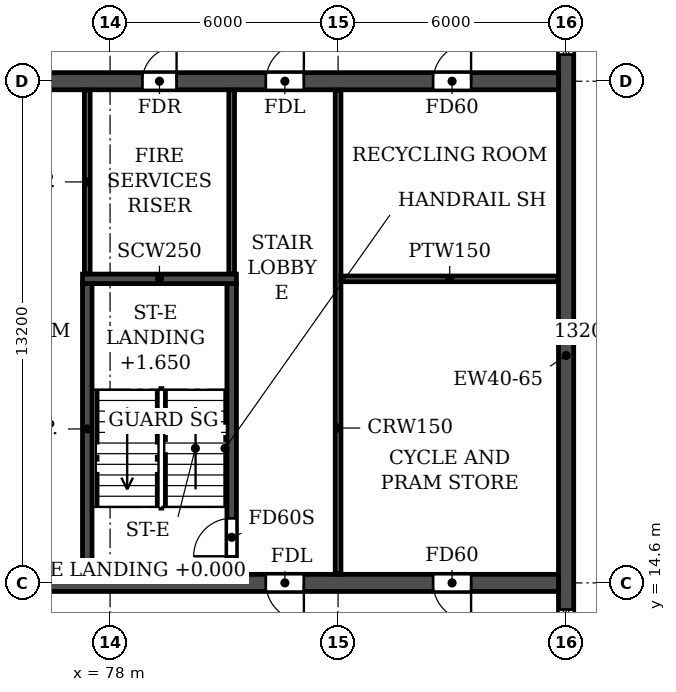
"""IFC4 building model, lengths in metres.
Left out: names, types, materials, properties, quantities, classifications, styles, units other than length and angle.
Written with IfcOpenShell. Run it as: python <this file> out.ifc"""

import sys

from ifc_helpers import new_model, si_unit, direction, frame, frame_2d, origin, place, context, subcontext, project, spatial, rectangle, extrude, element, fill, save


model = new_model("IFC4")
c1 = context("Model", 3, precision=1e-05, world=origin(), true_north=direction((0.0, 1.0)))
c2 = subcontext(c1, "Body", "Model", "MODEL_VIEW")
j1 = project(units=[si_unit("LENGTHUNIT", "METRE"), si_unit("PLANEANGLEUNIT", "RADIAN")], contexts=[c1])
p1 = place(None, origin())
s1 = spatial("IfcSite", under=j1, at=p1, CompositionType="ELEMENT")
p2 = place(p1, origin())
s2 = spatial("IfcBuilding", under=s1, at=p2, CompositionType="ELEMENT")
p3 = place(p2, frame((0.0, 0.0, 132.3)))
s3 = spatial("IfcBuildingStorey", under=s2, at=p3, CompositionType="ELEMENT", Elevation=132.3)
p4 = place(p3, frame((90.0, 4.683, 0.0), z_axis=(0.0, 0.0, 1.0), x_axis=(0.0, 1.0, 0.0)))
e1 = element("IfcWall", 1, at=p4, inside=s3, PredefinedType="SHEAR", context=c2, shape_type="SweptSolid", body=[
    extrude(rectangle(XDim=33.034, YDim=0.4, at=frame_2d((16.517, 0.0))), origin(), (0.0, 0.0, 1.0), 3.07),
])
p5 = place(p4, frame((23.817, 0.0, 0.9)))
e2 = element("IfcOpeningElement", 2, at=p5, cuts=e1, PredefinedType="OPENING", context=c2, shape_type="SweptSolid", body=[
    extrude(rectangle(XDim=1.2, YDim=1.5, at=frame_2d((0.6, 0.75))), frame((0.0, 0.21, 0.0), z_axis=(0.0, -1.0, 0.0), x_axis=(1.0, 0.0, 0.0)), (0.0, 0.0, 1.0), 0.42),
])
p6 = place(p4, frame((8.017, 0.0, 0.9)))
e3 = element("IfcOpeningElement", 3, at=p6, cuts=e1, PredefinedType="OPENING", context=c2, shape_type="SweptSolid", body=[
    extrude(rectangle(XDim=1.2, YDim=1.5, at=frame_2d((0.6, 0.75))), frame((0.0, 0.21, 0.0), z_axis=(0.0, -1.0, 0.0), x_axis=(1.0, 0.0, 0.0)), (0.0, 0.0, 1.0), 0.42),
])
p7 = place(p4, frame((28.293, 0.0, 0.6)))
e4 = element("IfcOpeningElement", 4, at=p7, cuts=e1, PredefinedType="OPENING", context=c2, shape_type="SweptSolid", body=[
    extrude(rectangle(XDim=2.2, YDim=1.8, at=frame_2d((1.1, 0.9))), frame((0.0, 0.21, 0.0), z_axis=(0.0, -1.0, 0.0), x_axis=(1.0, 0.0, 0.0)), (0.0, 0.0, 1.0), 0.42),
])
p8 = place(p4, frame((2.541, 0.0, 0.6)))
e5 = element("IfcOpeningElement", 5, at=p8, cuts=e1, PredefinedType="OPENING", context=c2, shape_type="SweptSolid", body=[
    extrude(rectangle(XDim=2.2, YDim=1.8, at=frame_2d((1.1, 0.9))), frame((0.0, 0.21, 0.0), z_axis=(0.0, -1.0, 0.0), x_axis=(1.0, 0.0, 0.0)), (0.0, 0.0, 1.0), 0.42),
])
p9 = place(p3, frame((12.2, 14.6, 0.0), z_axis=(0.0, 0.0, 1.0), x_axis=(1.0, 0.0, 0.0)))
e6 = element("IfcWall", 6, at=p9, inside=s3, PredefinedType="SOLIDWALL", context=c2, shape_type="SweptSolid", body=[
    extrude(rectangle(XDim=77.6, YDim=0.45, at=frame_2d((38.8, 0.0))), origin(), (0.0, 0.0, 1.0), 3.07),
])
p10 = place(p9, frame((2.3, 0.0, 0.0)))
e7 = element("IfcOpeningElement", 7, at=p10, cuts=e6, PredefinedType="OPENING", context=c2, shape_type="SweptSolid", body=[
    extrude(rectangle(XDim=1.0, YDim=2.1, at=frame_2d((0.5, 1.05))), frame((0.0, 0.235, 0.0), z_axis=(0.0, -1.0, 0.0), x_axis=(1.0, 0.0, 0.0)), (0.0, 0.0, 1.0), 0.47),
])
p11 = place(p9, frame((6.7, 0.0, 0.0)))
e8 = element("IfcOpeningElement", 8, at=p11, cuts=e6, PredefinedType="OPENING", context=c2, shape_type="SweptSolid", body=[
    extrude(rectangle(XDim=1.0, YDim=2.1, at=frame_2d((0.5, 1.05))), frame((0.0, 0.235, 0.0), z_axis=(0.0, -1.0, 0.0), x_axis=(1.0, 0.0, 0.0)), (0.0, 0.0, 1.0), 0.47),
])
p12 = place(p9, frame((14.6, 0.0, 0.0)))
e9 = element("IfcOpeningElement", 9, at=p12, cuts=e6, PredefinedType="OPENING", context=c2, shape_type="SweptSolid", body=[
    extrude(rectangle(XDim=1.0, YDim=2.1, at=frame_2d((0.5, 1.05))), frame((0.0, 0.235, 0.0), z_axis=(0.0, -1.0, 0.0), x_axis=(1.0, 0.0, 0.0)), (0.0, 0.0, 1.0), 0.47),
])
p13 = place(p9, frame((19.2, 0.0, 0.0)))
e10 = element("IfcOpeningElement", 10, at=p13, cuts=e6, PredefinedType="OPENING", context=c2, shape_type="SweptSolid", body=[
    extrude(rectangle(XDim=1.0, YDim=2.1, at=frame_2d((0.5, 1.05))), frame((0.0, 0.235, 0.0), z_axis=(0.0, -1.0, 0.0), x_axis=(1.0, 0.0, 0.0)), (0.0, 0.0, 1.0), 0.47),
])
p14 = place(p9, frame((31.55, 0.0, 0.0)))
e11 = element("IfcOpeningElement", 11, at=p14, cuts=e6, PredefinedType="OPENING", context=c2, shape_type="SweptSolid", body=[
    extrude(rectangle(XDim=1.5, YDim=2.1, at=frame_2d((0.75, 1.05))), frame((0.0, 0.235, 0.0), z_axis=(0.0, -1.0, 0.0), x_axis=(1.0, 0.0, 0.0)), (0.0, 0.0, 1.0), 0.47),
])
p15 = place(p9, frame((35.7, 0.0, 0.0)))
e12 = element("IfcOpeningElement", 12, at=p15, cuts=e6, PredefinedType="OPENING", context=c2, shape_type="SweptSolid", body=[
    extrude(rectangle(XDim=1.0, YDim=2.1, at=frame_2d((0.5, 1.05))), frame((0.0, 0.235, 0.0), z_axis=(0.0, -1.0, 0.0), x_axis=(1.0, 0.0, 0.0)), (0.0, 0.0, 1.0), 0.47),
])
p16 = place(p9, frame((38.3, 0.0, 0.0)))
e13 = element("IfcOpeningElement", 13, at=p16, cuts=e6, PredefinedType="OPENING", context=c2, shape_type="SweptSolid", body=[
    extrude(rectangle(XDim=1.0, YDim=2.1, at=frame_2d((0.5, 1.05))), frame((0.0, 0.235, 0.0), z_axis=(0.0, -1.0, 0.0), x_axis=(1.0, 0.0, 0.0)), (0.0, 0.0, 1.0), 0.47),
])
p17 = place(p9, frame((40.9, 0.0, 0.0)))
e14 = element("IfcOpeningElement", 14, at=p17, cuts=e6, PredefinedType="OPENING", context=c2, shape_type="SweptSolid", body=[
    extrude(rectangle(XDim=1.0, YDim=2.1, at=frame_2d((0.5, 1.05))), frame((0.0, 0.235, 0.0), z_axis=(0.0, -1.0, 0.0), x_axis=(1.0, 0.0, 0.0)), (0.0, 0.0, 1.0), 0.47),
])
p18 = place(p9, frame((44.55, 0.0, 0.0)))
e15 = element("IfcOpeningElement", 15, at=p18, cuts=e6, PredefinedType="OPENING", context=c2, shape_type="SweptSolid", body=[
    extrude(rectangle(XDim=1.5, YDim=2.1, at=frame_2d((0.75, 1.05))), frame((0.0, 0.235, 0.0), z_axis=(0.0, -1.0, 0.0), x_axis=(1.0, 0.0, 0.0)), (0.0, 0.0, 1.0), 0.47),
])
p19 = place(p9, frame((57.4, 0.0, 0.0)))
e16 = element("IfcOpeningElement", 16, at=p19, cuts=e6, PredefinedType="OPENING", context=c2, shape_type="SweptSolid", body=[
    extrude(rectangle(XDim=1.0, YDim=2.1, at=frame_2d((0.5, 1.05))), frame((0.0, 0.235, 0.0), z_axis=(0.0, -1.0, 0.0), x_axis=(1.0, 0.0, 0.0)), (0.0, 0.0, 1.0), 0.47),
])
p20 = place(p9, frame((62.0, 0.0, 0.0)))
e17 = element("IfcOpeningElement", 17, at=p20, cuts=e6, PredefinedType="OPENING", context=c2, shape_type="SweptSolid", body=[
    extrude(rectangle(XDim=1.0, YDim=2.1, at=frame_2d((0.5, 1.05))), frame((0.0, 0.235, 0.0), z_axis=(0.0, -1.0, 0.0), x_axis=(1.0, 0.0, 0.0)), (0.0, 0.0, 1.0), 0.47),
])
p21 = place(p9, frame((69.9, 0.0, 0.0)))
e18 = element("IfcOpeningElement", 18, at=p21, cuts=e6, PredefinedType="OPENING", context=c2, shape_type="SweptSolid", body=[
    extrude(rectangle(XDim=1.0, YDim=2.1, at=frame_2d((0.5, 1.05))), frame((0.0, 0.235, 0.0), z_axis=(0.0, -1.0, 0.0), x_axis=(1.0, 0.0, 0.0)), (0.0, 0.0, 1.0), 0.47),
])
p22 = place(p9, frame((74.3, 0.0, 0.0)))
e19 = element("IfcOpeningElement", 19, at=p22, cuts=e6, PredefinedType="OPENING", context=c2, shape_type="SweptSolid", body=[
    extrude(rectangle(XDim=1.0, YDim=2.1, at=frame_2d((0.5, 1.05))), frame((0.0, 0.235, 0.0), z_axis=(0.0, -1.0, 0.0), x_axis=(1.0, 0.0, 0.0)), (0.0, 0.0, 1.0), 0.47),
])
p23 = place(p3, frame((12.2, 27.8, 0.0), z_axis=(0.0, 0.0, 1.0), x_axis=(1.0, 0.0, 0.0)))
e20 = element("IfcWall", 20, at=p23, inside=s3, PredefinedType="SOLIDWALL", context=c2, shape_type="SweptSolid", body=[
    extrude(rectangle(XDim=77.6, YDim=0.45, at=frame_2d((38.8, 0.0))), origin(), (0.0, 0.0, 1.0), 3.07),
])
p24 = place(p23, frame((2.05, 0.0, 0.0)))
e21 = element("IfcOpeningElement", 21, at=p24, cuts=e20, PredefinedType="OPENING", context=c2, shape_type="SweptSolid", body=[
    extrude(rectangle(XDim=1.5, YDim=2.1, at=frame_2d((0.75, 1.05))), frame((0.0, 0.235, 0.0), z_axis=(0.0, -1.0, 0.0), x_axis=(1.0, 0.0, 0.0)), (0.0, 0.0, 1.0), 0.47),
])
p25 = place(p23, frame((6.7, 0.0, 0.0)))
e22 = element("IfcOpeningElement", 22, at=p25, cuts=e20, PredefinedType="OPENING", context=c2, shape_type="SweptSolid", body=[
    extrude(rectangle(XDim=1.0, YDim=2.1, at=frame_2d((0.5, 1.05))), frame((0.0, 0.235, 0.0), z_axis=(0.0, -1.0, 0.0), x_axis=(1.0, 0.0, 0.0)), (0.0, 0.0, 1.0), 0.47),
])
p26 = place(p23, frame((10.05, 0.0, 0.0)))
e23 = element("IfcOpeningElement", 23, at=p26, cuts=e20, PredefinedType="OPENING", context=c2, shape_type="SweptSolid", body=[
    extrude(rectangle(XDim=0.9, YDim=2.1, at=frame_2d((0.45, 1.05))), frame((0.0, 0.235, 0.0), z_axis=(0.0, -1.0, 0.0), x_axis=(1.0, 0.0, 0.0)), (0.0, 0.0, 1.0), 0.47),
])
p27 = place(p23, frame((19.25, 0.0, 0.0)))
e24 = element("IfcOpeningElement", 24, at=p27, cuts=e20, PredefinedType="OPENING", context=c2, shape_type="SweptSolid", body=[
    extrude(rectangle(XDim=0.9, YDim=2.1, at=frame_2d((0.45, 1.05))), frame((0.0, 0.235, 0.0), z_axis=(0.0, -1.0, 0.0), x_axis=(1.0, 0.0, 0.0)), (0.0, 0.0, 1.0), 0.47),
])
p28 = place(p23, frame((22.4, 0.0, 0.0)))
e25 = element("IfcOpeningElement", 25, at=p28, cuts=e20, PredefinedType="OPENING", context=c2, shape_type="SweptSolid", body=[
    extrude(rectangle(XDim=1.0, YDim=2.1, at=frame_2d((0.5, 1.05))), frame((0.0, 0.235, 0.0), z_axis=(0.0, -1.0, 0.0), x_axis=(1.0, 0.0, 0.0)), (0.0, 0.0, 1.0), 0.47),
])
p29 = place(p23, frame((27.6, 0.0, 0.0)))
e26 = element("IfcOpeningElement", 26, at=p29, cuts=e20, PredefinedType="OPENING", context=c2, shape_type="SweptSolid", body=[
    extrude(rectangle(XDim=1.0, YDim=2.1, at=frame_2d((0.5, 1.05))), frame((0.0, 0.235, 0.0), z_axis=(0.0, -1.0, 0.0), x_axis=(1.0, 0.0, 0.0)), (0.0, 0.0, 1.0), 0.47),
])
p30 = place(p23, frame((35.4, 0.0, 0.0)))
e27 = element("IfcOpeningElement", 27, at=p30, cuts=e20, PredefinedType="OPENING", context=c2, shape_type="SweptSolid", body=[
    extrude(rectangle(XDim=1.0, YDim=2.1, at=frame_2d((0.5, 1.05))), frame((0.0, 0.235, 0.0), z_axis=(0.0, -1.0, 0.0), x_axis=(1.0, 0.0, 0.0)), (0.0, 0.0, 1.0), 0.47),
])
p31 = place(p23, frame((38.3, 0.0, 0.0)))
e28 = element("IfcOpeningElement", 28, at=p31, cuts=e20, PredefinedType="OPENING", context=c2, shape_type="SweptSolid", body=[
    extrude(rectangle(XDim=1.0, YDim=2.1, at=frame_2d((0.5, 1.05))), frame((0.0, 0.235, 0.0), z_axis=(0.0, -1.0, 0.0), x_axis=(1.0, 0.0, 0.0)), (0.0, 0.0, 1.0), 0.47),
])
p32 = place(p23, frame((41.2, 0.0, 0.0)))
e29 = element("IfcOpeningElement", 29, at=p32, cuts=e20, PredefinedType="OPENING", context=c2, shape_type="SweptSolid", body=[
    extrude(rectangle(XDim=1.0, YDim=2.1, at=frame_2d((0.5, 1.05))), frame((0.0, 0.235, 0.0), z_axis=(0.0, -1.0, 0.0), x_axis=(1.0, 0.0, 0.0)), (0.0, 0.0, 1.0), 0.47),
])
p33 = place(p23, frame((43.8, 0.0, 0.0)))
e30 = element("IfcOpeningElement", 30, at=p33, cuts=e20, PredefinedType="OPENING", context=c2, shape_type="SweptSolid", body=[
    extrude(rectangle(XDim=1.0, YDim=2.1, at=frame_2d((0.5, 1.05))), frame((0.0, 0.235, 0.0), z_axis=(0.0, -1.0, 0.0), x_axis=(1.0, 0.0, 0.0)), (0.0, 0.0, 1.0), 0.47),
])
p34 = place(p23, frame((47.7, 0.0, 0.0)))
e31 = element("IfcOpeningElement", 31, at=p34, cuts=e20, PredefinedType="OPENING", context=c2, shape_type="SweptSolid", body=[
    extrude(rectangle(XDim=1.0, YDim=2.1, at=frame_2d((0.5, 1.05))), frame((0.0, 0.235, 0.0), z_axis=(0.0, -1.0, 0.0), x_axis=(1.0, 0.0, 0.0)), (0.0, 0.0, 1.0), 0.47),
])
p35 = place(p23, frame((51.6, 0.0, 0.0)))
e32 = element("IfcOpeningElement", 32, at=p35, cuts=e20, PredefinedType="OPENING", context=c2, shape_type="SweptSolid", body=[
    extrude(rectangle(XDim=1.0, YDim=2.1, at=frame_2d((0.5, 1.05))), frame((0.0, 0.235, 0.0), z_axis=(0.0, -1.0, 0.0), x_axis=(1.0, 0.0, 0.0)), (0.0, 0.0, 1.0), 0.47),
])
p36 = place(p23, frame((54.2, 0.0, 0.0)))
e33 = element("IfcOpeningElement", 33, at=p36, cuts=e20, PredefinedType="OPENING", context=c2, shape_type="SweptSolid", body=[
    extrude(rectangle(XDim=1.0, YDim=2.1, at=frame_2d((0.5, 1.05))), frame((0.0, 0.235, 0.0), z_axis=(0.0, -1.0, 0.0), x_axis=(1.0, 0.0, 0.0)), (0.0, 0.0, 1.0), 0.47),
])
p37 = place(p23, frame((57.45, 0.0, 0.0)))
e34 = element("IfcOpeningElement", 34, at=p37, cuts=e20, PredefinedType="OPENING", context=c2, shape_type="SweptSolid", body=[
    extrude(rectangle(XDim=0.9, YDim=2.1, at=frame_2d((0.45, 1.05))), frame((0.0, 0.235, 0.0), z_axis=(0.0, -1.0, 0.0), x_axis=(1.0, 0.0, 0.0)), (0.0, 0.0, 1.0), 0.47),
])
p38 = place(p23, frame((66.65, 0.0, 0.0)))
e35 = element("IfcOpeningElement", 35, at=p38, cuts=e20, PredefinedType="OPENING", context=c2, shape_type="SweptSolid", body=[
    extrude(rectangle(XDim=0.9, YDim=2.1, at=frame_2d((0.45, 1.05))), frame((0.0, 0.235, 0.0), z_axis=(0.0, -1.0, 0.0), x_axis=(1.0, 0.0, 0.0)), (0.0, 0.0, 1.0), 0.47),
])
p39 = place(p23, frame((69.9, 0.0, 0.0)))
e36 = element("IfcOpeningElement", 36, at=p39, cuts=e20, PredefinedType="OPENING", context=c2, shape_type="SweptSolid", body=[
    extrude(rectangle(XDim=1.0, YDim=2.1, at=frame_2d((0.5, 1.05))), frame((0.0, 0.235, 0.0), z_axis=(0.0, -1.0, 0.0), x_axis=(1.0, 0.0, 0.0)), (0.0, 0.0, 1.0), 0.47),
])
p40 = place(p23, frame((74.3, 0.0, 0.0)))
e37 = element("IfcOpeningElement", 37, at=p40, cuts=e20, PredefinedType="OPENING", context=c2, shape_type="SweptSolid", body=[
    extrude(rectangle(XDim=1.0, YDim=2.1, at=frame_2d((0.5, 1.05))), frame((0.0, 0.235, 0.0), z_axis=(0.0, -1.0, 0.0), x_axis=(1.0, 0.0, 0.0)), (0.0, 0.0, 1.0), 0.47),
])
p41 = place(p3, frame((77.4, 14.825, 0.0), z_axis=(0.0, 0.0, 1.0), x_axis=(0.0, 1.0, 0.0)))
e38 = element("IfcWall", 38, at=p41, inside=s3, PredefinedType="SOLIDWALL", context=c2, shape_type="SweptSolid", body=[
    extrude(rectangle(XDim=7.65, YDim=0.25, at=frame_2d((3.825, 0.0))), origin(), (0.0, 0.0, 1.0), 3.07),
])
p42 = place(p3, frame((81.2, 14.825, 0.0), z_axis=(0.0, 0.0, 1.0), x_axis=(0.0, 1.0, 0.0)))
e39 = element("IfcWall", 39, at=p42, inside=s3, PredefinedType="SOLIDWALL", context=c2, shape_type="SweptSolid", body=[
    extrude(rectangle(XDim=7.65, YDim=0.25, at=frame_2d((3.825, 0.0))), origin(), (0.0, 0.0, 1.0), 3.07),
])
p43 = place(p42, frame((0.475, 0.0, 0.0)))
e40 = element("IfcOpeningElement", 40, at=p43, cuts=e39, PredefinedType="OPENING", context=c2, shape_type="SweptSolid", body=[
    extrude(rectangle(XDim=1.0, YDim=2.1, at=frame_2d((0.5, 1.05))), frame((0.0, 0.135, 0.0), z_axis=(0.0, -1.0, 0.0), x_axis=(1.0, 0.0, 0.0)), (0.0, 0.0, 1.0), 0.27),
])
p44 = place(p3, frame((77.275, 22.6, 0.0), z_axis=(0.0, 0.0, 1.0), x_axis=(1.0, 0.0, 0.0)))
e41 = element("IfcWall", 41, at=p44, inside=s3, PredefinedType="SOLIDWALL", context=c2, shape_type="SweptSolid", body=[
    extrude(rectangle(XDim=4.05, YDim=0.25, at=frame_2d((2.025, 0.0))), origin(), (0.0, 0.0, 1.0), 3.07),
])
p45 = place(p3, frame((84.0, 14.835, 0.0), z_axis=(0.0, 0.0, 1.0), x_axis=(0.0, 1.0, 0.0)))
e42 = element("IfcWall", 42, at=p45, inside=s3, PredefinedType="PARTITIONING", context=c2, shape_type="SweptSolid", body=[
    extrude(rectangle(XDim=12.73, YDim=0.15, at=frame_2d((6.365, 0.0))), origin(), (0.0, 0.0, 1.0), 3.07),
])
p46 = place(p3, frame((84.075, 22.6, 0.0), z_axis=(0.0, 0.0, 1.0), x_axis=(1.0, 0.0, 0.0)))
e43 = element("IfcWall", 43, at=p46, inside=s3, PredefinedType="PARTITIONING", context=c2, shape_type="SweptSolid", body=[
    extrude(rectangle(XDim=5.715, YDim=0.15, at=frame_2d((2.857, 0.0))), origin(), (0.0, 0.0, 1.0), 3.07),
])
for number, where, z_axis, x_axis in (
    (44, (77.4, 22.735, 0.0), (0.0, 0.0, 1.0), (0.0, 1.0, 0.0)),
    (45, (81.2, 22.735, 0.0), (0.0, 0.0, 1.0), (0.0, 1.0, 0.0)),
):
    element("IfcWall", number, at=place(p3, frame(where, z_axis=z_axis, x_axis=x_axis)), inside=s3, PredefinedType="PARTITIONING", context=c2, shape_type="SweptSolid", body=[
        extrude(rectangle(XDim=4.83, YDim=0.15, at=frame_2d((2.415, 0.0))), origin(), (0.0, 0.0, 1.0), 3.07),
    ])
p47 = place(p5, origin())
e46 = element("IfcWindow", 46, at=p47, inside=s3, PartitioningType="SINGLE_PANEL", PredefinedType="WINDOW", context=c2, shape_type="SweptSolid", body=[
    extrude(rectangle(XDim=1.2, YDim=1.5, at=frame_2d((0.6, 0.75))), frame((0.0, 0.03, 0.0), z_axis=(0.0, -1.0, 0.0), x_axis=(1.0, 0.0, 0.0)), (0.0, 0.0, 1.0), 0.06),
])
fill(e2, e46)
p48 = place(p6, origin())
e47 = element("IfcWindow", 47, at=p48, inside=s3, PartitioningType="SINGLE_PANEL", PredefinedType="WINDOW", context=c2, shape_type="SweptSolid", body=[
    extrude(rectangle(XDim=1.2, YDim=1.5, at=frame_2d((0.6, 0.75))), frame((0.0, 0.03, 0.0), z_axis=(0.0, -1.0, 0.0), x_axis=(1.0, 0.0, 0.0)), (0.0, 0.0, 1.0), 0.06),
])
fill(e3, e47)
p49 = place(p38, origin())
e48 = element("IfcDoor", 48, at=p49, inside=s3, OperationType="SINGLE_SWING_RIGHT", PredefinedType="DOOR", context=c2, shape_type="SweptSolid", body=[
    extrude(rectangle(XDim=0.9, YDim=2.1, at=frame_2d((0.45, 1.05))), frame((0.0, 0.025, 0.0), z_axis=(0.0, -1.0, 0.0), x_axis=(1.0, 0.0, 0.0)), (0.0, 0.0, 1.0), 0.05),
])
fill(e35, e48)
p50 = place(p39, origin())
e49 = element("IfcDoor", 49, at=p50, inside=s3, OperationType="SINGLE_SWING_RIGHT", PredefinedType="DOOR", context=c2, shape_type="SweptSolid", body=[
    extrude(rectangle(XDim=1.0, YDim=2.1, at=frame_2d((0.5, 1.05))), frame((0.0, 0.025, 0.0), z_axis=(0.0, -1.0, 0.0), x_axis=(1.0, 0.0, 0.0)), (0.0, 0.0, 1.0), 0.05),
])
fill(e36, e49)
p51 = place(p40, origin())
e50 = element("IfcDoor", 50, at=p51, inside=s3, OperationType="SINGLE_SWING_RIGHT", PredefinedType="DOOR", context=c2, shape_type="SweptSolid", body=[
    extrude(rectangle(XDim=1.0, YDim=2.1, at=frame_2d((0.5, 1.05))), frame((0.0, 0.025, 0.0), z_axis=(0.0, -1.0, 0.0), x_axis=(1.0, 0.0, 0.0)), (0.0, 0.0, 1.0), 0.05),
])
fill(e37, e50)
p52 = place(p21, frame((1.0, 0.0, 0.0), z_axis=(0.0, 0.0, 1.0), x_axis=(-1.0, 0.0, 0.0)))
e51 = element("IfcDoor", 51, at=p52, inside=s3, OperationType="SINGLE_SWING_LEFT", PredefinedType="DOOR", context=c2, shape_type="SweptSolid", body=[
    extrude(rectangle(XDim=1.0, YDim=2.1, at=frame_2d((0.5, 1.05))), frame((0.0, 0.025, 0.0), z_axis=(0.0, -1.0, 0.0), x_axis=(1.0, 0.0, 0.0)), (0.0, 0.0, 1.0), 0.05),
])
fill(e18, e51)
p53 = place(p22, frame((1.0, 0.0, 0.0), z_axis=(0.0, 0.0, 1.0), x_axis=(-1.0, 0.0, 0.0)))
e52 = element("IfcDoor", 52, at=p53, inside=s3, OperationType="SINGLE_SWING_LEFT", PredefinedType="DOOR", context=c2, shape_type="SweptSolid", body=[
    extrude(rectangle(XDim=1.0, YDim=2.1, at=frame_2d((0.5, 1.05))), frame((0.0, 0.025, 0.0), z_axis=(0.0, -1.0, 0.0), x_axis=(1.0, 0.0, 0.0)), (0.0, 0.0, 1.0), 0.05),
])
fill(e19, e52)
p54 = place(p43, origin())
e53 = element("IfcDoor", 53, at=p54, inside=s3, OperationType="SINGLE_SWING_LEFT", PredefinedType="DOOR", context=c2, shape_type="SweptSolid", body=[
    extrude(rectangle(XDim=1.0, YDim=2.1, at=frame_2d((0.5, 1.05))), frame((0.0, 0.025, 0.0), z_axis=(0.0, -1.0, 0.0), x_axis=(1.0, 0.0, 0.0)), (0.0, 0.0, 1.0), 0.05),
])
fill(e40, e53)
save(model, sys.argv[1])
